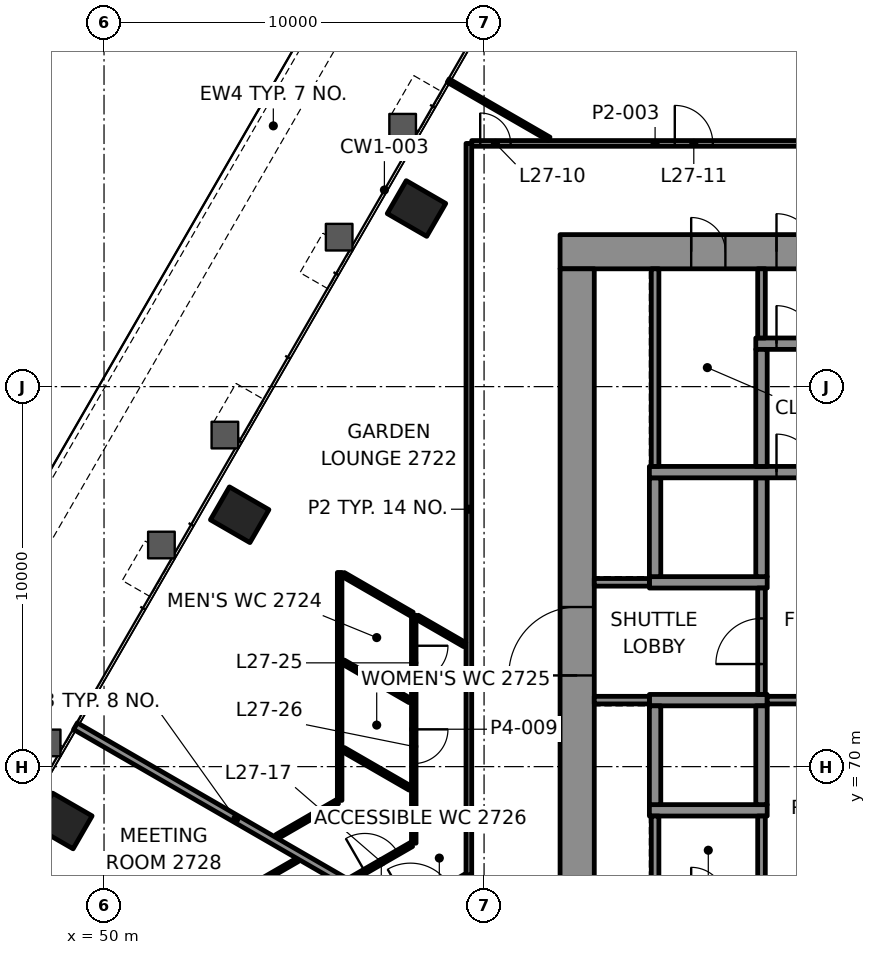
"""IFC4 building model, lengths in metres.
Left out: names, types, materials, properties, quantities, classifications, styles, units other than length and angle.
Written with IfcOpenShell. Run it as: python <this file> out.ifc"""

import sys

from ifc_helpers import new_model, si_unit, direction, frame, frame_2d, origin, origin_2d, place, context, subcontext, project, spatial, rectangle, extrude, element, fill, save


model = new_model("IFC4")
c1 = context("Model", 3, precision=1e-05, world=origin(), true_north=direction((0.0, 1.0)))
c2 = subcontext(c1, "Body", "Model", "MODEL_VIEW")
j1 = project(units=[si_unit("LENGTHUNIT", "METRE"), si_unit("PLANEANGLEUNIT", "RADIAN")], contexts=[c1])
p1 = place(None, origin())
s1 = spatial("IfcSite", under=j1, at=p1, CompositionType="ELEMENT")
p2 = place(p1, origin())
s2 = spatial("IfcBuilding", under=s1, at=p2, CompositionType="ELEMENT")
p3 = place(p2, frame((0.0, 0.0, 119.8)))
s3 = spatial("IfcBuildingStorey", under=s2, at=p3, CompositionType="ELEMENT", Elevation=119.8)
for number, where, z_axis, x_axis in (
    (1, (58.222, 84.687, -0.0), (0.0, 0.0, 1.0), (-0.5, -0.866, 0.0)),
    (2, (53.569, 76.628, -0.0), (0.0, 0.0, 1.0), (-0.5, -0.866, 0.0)),
    (3, (48.917, 68.57, -0.0), (0.0, 0.0, 1.0), (-0.5, -0.866, 0.0)),
):
    element("IfcColumn", number, at=place(p3, frame(where, z_axis=z_axis, x_axis=x_axis)), inside=s3, PredefinedType="COLUMN", context=c2, shape_type="SweptSolid", body=[
        extrude(rectangle(XDim=1.0, YDim=1.2, at=origin_2d()), origin(), (0.0, 0.0, 1.0), 4.2),
    ])
p4 = place(p3, frame((62.0, 83.55, 0.0), z_axis=(0.0, 0.0, 1.0), x_axis=(1.0, 0.0, 0.0)))
e4 = element("IfcWall", 4, at=p4, inside=s3, PredefinedType="SHEAR", context=c2, shape_type="SweptSolid", body=[
    extrude(rectangle(XDim=26.0, YDim=0.9, at=frame_2d((13.0, 0.0))), origin(), (0.0, 0.0, 1.0), 4.0),
])
p5 = place(p4, frame((5.695, 0.0, 0.0)))
e5 = element("IfcOpeningElement", 5, at=p5, cuts=e4, PredefinedType="OPENING", context=c2, shape_type="SweptSolid", body=[
    extrude(rectangle(XDim=1.0, YDim=2.1, at=frame_2d((0.5, 1.05))), frame((0.0, 0.46, 0.0), z_axis=(0.0, -1.0, 0.0), x_axis=(1.0, 0.0, 0.0)), (0.0, 0.0, 1.0), 0.92),
])
p6 = place(p4, frame((19.505, 0.0, 0.0)))
e6 = element("IfcOpeningElement", 6, at=p6, cuts=e4, PredefinedType="OPENING", context=c2, shape_type="SweptSolid", body=[
    extrude(rectangle(XDim=1.0, YDim=2.1, at=frame_2d((0.5, 1.05))), frame((0.0, 0.46, 0.0), z_axis=(0.0, -1.0, 0.0), x_axis=(1.0, 0.0, 0.0)), (0.0, 0.0, 1.0), 0.92),
])
p7 = place(p4, frame((3.45, 0.0, 0.0)))
e7 = element("IfcOpeningElement", 7, at=p7, cuts=e4, PredefinedType="OPENING", context=c2, shape_type="SweptSolid", body=[
    extrude(rectangle(XDim=0.9, YDim=2.1, at=frame_2d((0.45, 1.05))), frame((0.0, 0.46, 0.0), z_axis=(0.0, -1.0, 0.0), x_axis=(1.0, 0.0, 0.0)), (0.0, 0.0, 1.0), 0.92),
])
p8 = place(p4, frame((12.65, 0.0, 0.0)))
e8 = element("IfcOpeningElement", 8, at=p8, cuts=e4, PredefinedType="OPENING", context=c2, shape_type="SweptSolid", body=[
    extrude(rectangle(XDim=0.9, YDim=2.1, at=frame_2d((0.45, 1.05))), frame((0.0, 0.46, 0.0), z_axis=(0.0, -1.0, 0.0), x_axis=(1.0, 0.0, 0.0)), (0.0, 0.0, 1.0), 0.92),
])
p9 = place(p4, frame((22.55, 0.0, 0.0)))
e9 = element("IfcOpeningElement", 9, at=p9, cuts=e4, PredefinedType="OPENING", context=c2, shape_type="SweptSolid", body=[
    extrude(rectangle(XDim=0.9, YDim=2.1, at=frame_2d((0.45, 1.05))), frame((0.0, 0.46, 0.0), z_axis=(0.0, -1.0, 0.0), x_axis=(1.0, 0.0, 0.0)), (0.0, 0.0, 1.0), 0.92),
])
p10 = place(p3, frame((62.45, 66.9, 0.0), z_axis=(0.0, 0.0, 1.0), x_axis=(0.0, 1.0, 0.0)))
e10 = element("IfcWall", 10, at=p10, inside=s3, PredefinedType="SHEAR", context=c2, shape_type="SweptSolid", body=[
    extrude(rectangle(XDim=16.2, YDim=0.9, at=frame_2d((8.1, 0.0))), origin(), (0.0, 0.0, 1.0), 4.0),
])
p11 = place(p10, frame((5.5, 0.0, 0.0)))
e11 = element("IfcOpeningElement", 11, at=p11, cuts=e10, PredefinedType="OPENING", context=c2, shape_type="SweptSolid", body=[
    extrude(rectangle(XDim=1.8, YDim=2.1, at=frame_2d((0.9, 1.05))), frame((0.0, 0.46, 0.0), z_axis=(0.0, -1.0, 0.0), x_axis=(1.0, 0.0, 0.0)), (0.0, 0.0, 1.0), 0.92),
])
for number, where, z_axis, x_axis in (
    (12, (64.35, 68.85, 0.0), (0.0, 0.0, 1.0), (1.0, 0.0, 0.0)),
    (13, (64.35, 71.75, 0.0), (0.0, 0.0, 1.0), (1.0, 0.0, 0.0)),
    (14, (64.35, 74.85, 0.0), (0.0, 0.0, 1.0), (1.0, 0.0, 0.0)),
):
    element("IfcWall", number, at=place(p3, frame(where, z_axis=z_axis, x_axis=x_axis)), inside=s3, PredefinedType="SHEAR", context=c2, shape_type="SweptSolid", body=[
        extrude(rectangle(XDim=3.1, YDim=0.3, at=frame_2d((1.55, 0.0))), origin(), (0.0, 0.0, 1.0), 4.0),
    ])
for number, where, z_axis, x_axis in (
    (15, (64.5, 69.0, 0.0), (0.0, 0.0, 1.0), (0.0, 1.0, 0.0)),
    (16, (64.5, 75.0, 0.0), (0.0, 0.0, 1.0), (0.0, 1.0, 0.0)),
    (17, (67.3, 69.0, 0.0), (0.0, 0.0, 1.0), (0.0, 1.0, 0.0)),
    (18, (67.3, 75.0, 0.0), (0.0, 0.0, 1.0), (0.0, 1.0, 0.0)),
):
    element("IfcWall", number, at=place(p3, frame(where, z_axis=z_axis, x_axis=x_axis)), inside=s3, PredefinedType="SHEAR", context=c2, shape_type="SweptSolid", body=[
        extrude(rectangle(XDim=2.6, YDim=0.3, at=frame_2d((1.3, 0.0))), origin(), (0.0, 0.0, 1.0), 4.0),
    ])
p12 = place(p3, frame((64.35, 77.75, 0.0), z_axis=(0.0, 0.0, 1.0), x_axis=(1.0, 0.0, 0.0)))
e19 = element("IfcWall", 19, at=p12, inside=s3, PredefinedType="SHEAR", context=c2, shape_type="SweptSolid", body=[
    extrude(rectangle(XDim=22.75, YDim=0.3, at=frame_2d((11.375, 0.0))), origin(), (0.0, 0.0, 1.0), 4.0),
])
p13 = place(p12, frame((3.345, 0.0, 0.0)))
e20 = element("IfcOpeningElement", 20, at=p13, cuts=e19, PredefinedType="OPENING", context=c2, shape_type="SweptSolid", body=[
    extrude(rectangle(XDim=1.0, YDim=2.1, at=frame_2d((0.5, 1.05))), frame((0.0, 0.16, 0.0), z_axis=(0.0, -1.0, 0.0), x_axis=(1.0, 0.0, 0.0)), (0.0, 0.0, 1.0), 0.32),
])
p14 = place(p3, frame((67.15, 81.13, 0.0), z_axis=(0.0, 0.0, 1.0), x_axis=(1.0, 0.0, 0.0)))
e21 = element("IfcWall", 21, at=p14, inside=s3, PredefinedType="SHEAR", context=c2, shape_type="SweptSolid", body=[
    extrude(rectangle(XDim=6.91, YDim=0.3, at=frame_2d((3.455, 0.0))), origin(), (0.0, 0.0, 1.0), 4.0),
])
p15 = place(p14, frame((0.545, 0.0, 0.0)))
e22 = element("IfcOpeningElement", 22, at=p15, cuts=e21, PredefinedType="OPENING", context=c2, shape_type="SweptSolid", body=[
    extrude(rectangle(XDim=1.0, YDim=2.1, at=frame_2d((0.5, 1.05))), frame((0.0, 0.16, 0.0), z_axis=(0.0, -1.0, 0.0), x_axis=(1.0, 0.0, 0.0)), (0.0, 0.0, 1.0), 0.32),
])
p16 = place(p3, frame((67.3, 77.9, 0.0), z_axis=(0.0, 0.0, 1.0), x_axis=(0.0, 1.0, 0.0)))
e23 = element("IfcWall", 23, at=p16, inside=s3, PredefinedType="SHEAR", context=c2, shape_type="SweptSolid", body=[
    extrude(rectangle(XDim=3.08, YDim=0.3, at=frame_2d((1.54, 0.0))), origin(), (0.0, 0.0, 1.0), 4.0),
])
p17 = place(p3, frame((59.676, 86.4, 0.0), z_axis=(0.0, 0.0, 1.0), x_axis=(1.0, 0.0, 0.0)))
e24 = element("IfcWall", 24, at=p17, inside=s3, PredefinedType="PARTITIONING", context=c2, shape_type="SweptSolid", body=[
    extrude(rectangle(XDim=9.649, YDim=0.15, at=frame_2d((4.825, 0.0))), origin(), (0.0, 0.0, 1.0), 3.4),
])
p18 = place(p17, frame((0.223, 0.0, 0.0)))
e25 = element("IfcOpeningElement", 25, at=p18, cuts=e24, PredefinedType="OPENING", context=c2, shape_type="SweptSolid", body=[
    extrude(rectangle(XDim=0.8, YDim=2.1, at=frame_2d((0.4, 1.05))), frame((0.0, 0.085, 0.0), z_axis=(0.0, -1.0, 0.0), x_axis=(1.0, 0.0, 0.0)), (0.0, 0.0, 1.0), 0.17),
])
p19 = place(p17, frame((5.343, 0.0, 0.0)))
e26 = element("IfcOpeningElement", 26, at=p19, cuts=e24, PredefinedType="OPENING", context=c2, shape_type="SweptSolid", body=[
    extrude(rectangle(XDim=1.0, YDim=2.1, at=frame_2d((0.5, 1.05))), frame((0.0, 0.085, 0.0), z_axis=(0.0, -1.0, 0.0), x_axis=(1.0, 0.0, 0.0)), (0.0, 0.0, 1.0), 0.17),
])
p20 = place(p3, frame((47.866, 60.374, 0.0), z_axis=(0.0, 0.0, 1.0), x_axis=(0.866031566243, 0.499989326157, 0.0)))
e27 = element("IfcWall", 27, at=p20, inside=s3, PredefinedType="PARTITIONING", context=c2, shape_type="SweptSolid", body=[
    extrude(rectangle(XDim=13.462, YDim=0.15, at=frame_2d((6.731, 0.0))), origin(), (0.0, 0.0, 1.0), 3.4),
])
p21 = place(p20, frame((11.774, 0.0, 0.0)))
e28 = element("IfcOpeningElement", 28, at=p21, cuts=e27, PredefinedType="OPENING", context=c2, shape_type="SweptSolid", body=[
    extrude(rectangle(XDim=1.2, YDim=2.1, at=frame_2d((0.6, 1.05))), frame((0.0, 0.085, 0.0), z_axis=(0.0, -1.0, 0.0), x_axis=(1.0, 0.0, 0.0)), (0.0, 0.0, 1.0), 0.17),
])
p22 = place(p3, frame((56.501, 67.033, 0.0), z_axis=(0.0, 0.0, 1.0), x_axis=(0.866023842607, 0.500002704028, 0.0)))
e29 = element("IfcWall", 29, at=p22, inside=s3, PredefinedType="PARTITIONING", context=c2, shape_type="SweptSolid", body=[
    extrude(rectangle(XDim=1.835, YDim=0.12, at=frame_2d((0.917, 0.0))), origin(), (0.0, 0.0, 1.0), 3.4),
])
p23 = place(p22, frame((0.417, 0.0, 0.0)))
e30 = element("IfcOpeningElement", 30, at=p23, cuts=e29, PredefinedType="OPENING", context=c2, shape_type="SweptSolid", body=[
    extrude(rectangle(XDim=1.0, YDim=2.1, at=frame_2d((0.5, 1.05))), frame((0.0, 0.07, 0.0), z_axis=(0.0, -1.0, 0.0), x_axis=(1.0, 0.0, 0.0)), (0.0, 0.0, 1.0), 0.14),
])
p24 = place(p3, frame((55.09, 67.547, 0.0), z_axis=(0.0, 0.0, 1.0), x_axis=(-0.8660245535, -0.500001472733, 0.0)))
e31 = element("IfcWall", 31, at=p24, inside=s3, PredefinedType="PARTITIONING", context=c2, shape_type="SweptSolid", body=[
    extrude(rectangle(XDim=6.968, YDim=0.1, at=frame_2d((3.484, 0.0))), origin(), (0.0, 0.0, 1.0), 3.4),
])
p25 = place(p24, frame((3.034, 0.0, 0.0)))
e32 = element("IfcOpeningElement", 32, at=p25, cuts=e31, PredefinedType="OPENING", context=c2, shape_type="SweptSolid", body=[
    extrude(rectangle(XDim=0.9, YDim=2.1, at=frame_2d((0.45, 1.05))), frame((0.0, 0.06, 0.0), z_axis=(0.0, -1.0, 0.0), x_axis=(1.0, 0.0, 0.0)), (0.0, 0.0, 1.0), 0.12),
])
p26 = place(p3, frame((54.551, 68.159, 0.0), z_axis=(0.0, 0.0, 1.0), x_axis=(0.866023842607, 0.500002704028, 0.0)))
e33 = element("IfcWall", 33, at=p26, inside=s3, PredefinedType="PARTITIONING", context=c2, shape_type="SweptSolid", body=[
    extrude(rectangle(XDim=1.835, YDim=0.12, at=frame_2d((0.917, 0.0))), origin(), (0.0, 0.0, 1.0), 3.4),
])
p27 = place(p3, frame((59.6, 67.148, 0.0), z_axis=(0.0, 0.0, 1.0), x_axis=(0.0, 1.0, 0.0)))
e34 = element("IfcWall", 34, at=p27, inside=s3, PredefinedType="PARTITIONING", context=c2, shape_type="SweptSolid", body=[
    extrude(rectangle(XDim=19.251, YDim=0.15, at=frame_2d((9.626, 0.0))), origin(), (0.0, 0.0, 1.0), 3.4),
])
p28 = place(p3, frame((58.15, 73.984, 0.0), z_axis=(0.0, 0.0, 1.0), x_axis=(0.0, -1.0, 0.0)))
e35 = element("IfcWall", 35, at=p28, inside=s3, PredefinedType="PARTITIONING", context=c2, shape_type="SweptSolid", body=[
    extrude(rectangle(XDim=5.999, YDim=0.12, at=frame_2d((3.0, 0.0))), origin(), (0.0, 0.0, 1.0), 3.4),
])
p29 = place(p28, frame((0.803, 0.0, 0.0)))
e36 = element("IfcOpeningElement", 36, at=p29, cuts=e35, PredefinedType="OPENING", context=c2, shape_type="SweptSolid", body=[
    extrude(rectangle(XDim=0.9, YDim=2.1, at=frame_2d((0.45, 1.05))), frame((0.0, 0.07, 0.0), z_axis=(0.0, -1.0, 0.0), x_axis=(1.0, 0.0, 0.0)), (0.0, 0.0, 1.0), 0.14),
])
p30 = place(p28, frame((3.003, 0.0, 0.0)))
e37 = element("IfcOpeningElement", 37, at=p30, cuts=e35, PredefinedType="OPENING", context=c2, shape_type="SweptSolid", body=[
    extrude(rectangle(XDim=0.9, YDim=2.1, at=frame_2d((0.45, 1.05))), frame((0.0, 0.07, 0.0), z_axis=(0.0, -1.0, 0.0), x_axis=(1.0, 0.0, 0.0)), (0.0, 0.0, 1.0), 0.14),
])
p31 = place(p3, frame((56.2, 69.111, 0.0), z_axis=(0.0, 0.0, 1.0), x_axis=(0.0, 1.0, 0.0)))
e38 = element("IfcWall", 38, at=p31, inside=s3, PredefinedType="PARTITIONING", context=c2, shape_type="SweptSolid", body=[
    extrude(rectangle(XDim=5.999, YDim=0.12, at=frame_2d((2.999, 0.0))), origin(), (0.0, 0.0, 1.0), 3.4),
])
p32 = place(p3, frame((61.71, 86.52, 0.0), z_axis=(0.0, 0.0, 1.0), x_axis=(-0.866038331766, 0.499977607411, 0.0)))
e39 = element("IfcWall", 39, at=p32, inside=s3, PredefinedType="PARTITIONING", context=c2, shape_type="SweptSolid", body=[
    extrude(rectangle(XDim=3.065, YDim=0.1, at=frame_2d((1.532, 0.0))), origin(), (0.0, 0.0, 1.0), 3.165),
])
p33 = place(p3, frame((59.49, 73.21, 0.0), z_axis=(0.0, 0.0, 1.0), x_axis=(-0.86596595808, 0.500102948848, 0.0)))
e40 = element("IfcWall", 40, at=p33, inside=s3, PredefinedType="PARTITIONING", context=c2, shape_type="SweptSolid", body=[
    extrude(rectangle(XDim=1.444, YDim=0.12, at=frame_2d((0.722, 0.0))), origin(), (0.0, 0.0, 1.0), 3.4),
])
for number, where, z_axis, x_axis in (
    (41, (58.055, 71.736, 0.0), (0.0, 0.0, 1.0), (-0.866, 0.5, 0.0)),
    (42, (58.055, 69.434, 0.0), (0.0, 0.0, 1.0), (-0.866, 0.5, 0.0)),
):
    element("IfcWall", number, at=place(p3, frame(where, z_axis=z_axis, x_axis=x_axis)), inside=s3, PredefinedType="PARTITIONING", context=c2, shape_type="SweptSolid", body=[
        extrude(rectangle(XDim=2.033, YDim=0.12, at=frame_2d((1.017, 0.0))), origin(), (0.0, 0.0, 1.0), 3.4),
    ])
p34 = place(p3, frame((57.689, 66.191, 0.0), z_axis=(0.0, 0.0, 1.0), x_axis=(-0.866022484486, 0.500005056339, 0.0)))
e43 = element("IfcWall", 43, at=p34, inside=s3, PredefinedType="PARTITIONING", context=c2, shape_type="SweptSolid", body=[
    extrude(rectangle(XDim=9.747, YDim=0.2, at=frame_2d((4.873, 0.0))), origin(), (0.0, 0.0, 1.0), 3.165),
])
p35 = place(p3, frame((58.105, 74.01, 0.0), z_axis=(0.0, 0.0, 1.0), x_axis=(-0.866028046028, 0.499995423472, 0.0)))
e44 = element("IfcWall", 44, at=p35, inside=s3, PredefinedType="PARTITIONING", context=c2, shape_type="SweptSolid", body=[
    extrude(rectangle(XDim=2.09, YDim=0.12, at=frame_2d((1.045, 0.0))), origin(), (0.0, 0.0, 1.0), 3.4),
])
p36 = place(p3, frame((69.117, 112.258, 0.0), z_axis=(0.0, 0.0, 1.0), x_axis=(-0.500000992643, -0.866024830681, 0.0)))
e45 = element("IfcWall", 45, at=p36, inside=s3, PredefinedType="SOLIDWALL", context=c2, shape_type="SweptSolid", body=[
    extrude(rectangle(XDim=58.649, YDim=0.8, at=frame_2d((29.325, 0.0))), origin(), (0.0, 0.0, 1.0), 0.9),
])
p37 = place(p3, frame((62.9, 71.75, 0.0), z_axis=(0.0, 0.0, 1.0), x_axis=(1.0, 0.0, 0.0)))
e46 = element("IfcWall", 46, at=p37, inside=s3, PredefinedType="PARTITIONING", context=c2, shape_type="SweptSolid", body=[
    extrude(rectangle(XDim=1.45, YDim=0.2, at=frame_2d((0.725, 0.0))), origin(), (0.0, 0.0, 1.0), 4.0),
])
p38 = place(p3, frame((67.45, 71.75, 0.0), z_axis=(0.0, 0.0, 1.0), x_axis=(1.0, 0.0, 0.0)))
e47 = element("IfcWall", 47, at=p38, inside=s3, PredefinedType="PARTITIONING", context=c2, shape_type="SweptSolid", body=[
    extrude(rectangle(XDim=2.85, YDim=0.2, at=frame_2d((1.425, 0.0))), origin(), (0.0, 0.0, 1.0), 4.0),
])
p39 = place(p3, frame((62.9, 74.85, 0.0), z_axis=(0.0, 0.0, 1.0), x_axis=(1.0, 0.0, 0.0)))
e48 = element("IfcWall", 48, at=p39, inside=s3, PredefinedType="PARTITIONING", context=c2, shape_type="SweptSolid", body=[
    extrude(rectangle(XDim=1.45, YDim=0.2, at=frame_2d((0.725, 0.0))), origin(), (0.0, 0.0, 1.0), 4.0),
])
p40 = place(p3, frame((64.5, 66.9, 0.0), z_axis=(0.0, 0.0, 1.0), x_axis=(0.0, 1.0, 0.0)))
e49 = element("IfcWall", 49, at=p40, inside=s3, PredefinedType="PARTITIONING", context=c2, shape_type="SweptSolid", body=[
    extrude(rectangle(XDim=1.8, YDim=0.2, at=frame_2d((0.9, 0.0))), origin(), (0.0, 0.0, 1.0), 4.0),
])
p41 = place(p3, frame((64.5, 77.9, 0.0), z_axis=(0.0, 0.0, 1.0), x_axis=(0.0, 1.0, 0.0)))
e50 = element("IfcWall", 50, at=p41, inside=s3, PredefinedType="PARTITIONING", context=c2, shape_type="SweptSolid", body=[
    extrude(rectangle(XDim=5.2, YDim=0.2, at=frame_2d((2.6, 0.0))), origin(), (0.0, 0.0, 1.0), 4.0),
])
p42 = place(p3, frame((67.3, 66.9, 0.0), z_axis=(0.0, 0.0, 1.0), x_axis=(0.0, 1.0, 0.0)))
e51 = element("IfcWall", 51, at=p42, inside=s3, PredefinedType="PARTITIONING", context=c2, shape_type="SweptSolid", body=[
    extrude(rectangle(XDim=1.8, YDim=0.2, at=frame_2d((0.9, 0.0))), origin(), (0.0, 0.0, 1.0), 4.0),
])
p43 = place(p3, frame((67.3, 71.9, 0.0), z_axis=(0.0, 0.0, 1.0), x_axis=(0.0, 1.0, 0.0)))
e52 = element("IfcWall", 52, at=p43, inside=s3, PredefinedType="PARTITIONING", context=c2, shape_type="SweptSolid", body=[
    extrude(rectangle(XDim=2.8, YDim=0.2, at=frame_2d((1.4, 0.0))), origin(), (0.0, 0.0, 1.0), 4.0),
])
p44 = place(p43, frame((0.8, 0.0, 0.0)))
e53 = element("IfcOpeningElement", 53, at=p44, cuts=e52, PredefinedType="OPENING", context=c2, shape_type="SweptSolid", body=[
    extrude(rectangle(XDim=1.2, YDim=2.1, at=frame_2d((0.6, 1.05))), frame((0.0, 0.11, 0.0), z_axis=(0.0, -1.0, 0.0), x_axis=(1.0, 0.0, 0.0)), (0.0, 0.0, 1.0), 0.22),
])
p45 = place(p3, frame((67.3, 81.28, 0.0), z_axis=(0.0, 0.0, 1.0), x_axis=(0.0, 1.0, 0.0)))
e54 = element("IfcWall", 54, at=p45, inside=s3, PredefinedType="PARTITIONING", context=c2, shape_type="SweptSolid", body=[
    extrude(rectangle(XDim=1.82, YDim=0.2, at=frame_2d((0.91, 0.0))), origin(), (0.0, 0.0, 1.0), 4.0),
])
p46 = place(p18, origin())
e55 = element("IfcDoor", 55, at=p46, inside=s3, OperationType="SINGLE_SWING_LEFT", PredefinedType="DOOR", context=c2, shape_type="SweptSolid", body=[
    extrude(rectangle(XDim=0.8, YDim=2.1, at=frame_2d((0.4, 1.05))), frame((0.0, 0.025, 0.0), z_axis=(0.0, -1.0, 0.0), x_axis=(1.0, 0.0, 0.0)), (0.0, 0.0, 1.0), 0.05),
])
fill(e25, e55)
p47 = place(p19, origin())
e56 = element("IfcDoor", 56, at=p47, inside=s3, OperationType="SINGLE_SWING_RIGHT", PredefinedType="DOOR", context=c2, shape_type="SweptSolid", body=[
    extrude(rectangle(XDim=1.0, YDim=2.1, at=frame_2d((0.5, 1.05))), frame((0.0, 0.025, 0.0), z_axis=(0.0, -1.0, 0.0), x_axis=(1.0, 0.0, 0.0)), (0.0, 0.0, 1.0), 0.05),
])
fill(e26, e56)
p48 = place(p23, origin())
e57 = element("IfcDoor", 57, at=p48, inside=s3, OperationType="SINGLE_SWING_LEFT", PredefinedType="DOOR", context=c2, shape_type="SweptSolid", body=[
    extrude(rectangle(XDim=1.0, YDim=2.1, at=frame_2d((0.5, 1.05))), frame((0.0, 0.025, 0.0), z_axis=(0.0, -1.0, 0.0), x_axis=(1.0, 0.0, 0.0)), (0.0, 0.0, 1.0), 0.05),
])
fill(e30, e57)
p49 = place(p29, origin())
e58 = element("IfcDoor", 58, at=p49, inside=s3, OperationType="SINGLE_SWING_RIGHT", PredefinedType="DOOR", context=c2, shape_type="SweptSolid", body=[
    extrude(rectangle(XDim=0.9, YDim=2.1, at=frame_2d((0.45, 1.05))), frame((0.0, 0.025, 0.0), z_axis=(0.0, -1.0, 0.0), x_axis=(1.0, 0.0, 0.0)), (0.0, 0.0, 1.0), 0.05),
])
fill(e36, e58)
p50 = place(p30, origin())
e59 = element("IfcDoor", 59, at=p50, inside=s3, OperationType="SINGLE_SWING_LEFT", PredefinedType="DOOR", context=c2, shape_type="SweptSolid", body=[
    extrude(rectangle(XDim=0.9, YDim=2.1, at=frame_2d((0.45, 1.05))), frame((0.0, 0.025, 0.0), z_axis=(0.0, -1.0, 0.0), x_axis=(1.0, 0.0, 0.0)), (0.0, 0.0, 1.0), 0.05),
])
fill(e37, e59)
p51 = place(p13, origin())
e60 = element("IfcDoor", 60, at=p51, inside=s3, OperationType="SINGLE_SWING_LEFT", PredefinedType="DOOR", context=c2, shape_type="SweptSolid", body=[
    extrude(rectangle(XDim=1.0, YDim=2.1, at=frame_2d((0.5, 1.05))), frame((0.0, 0.025, 0.0), z_axis=(0.0, -1.0, 0.0), x_axis=(1.0, 0.0, 0.0)), (0.0, 0.0, 1.0), 0.05),
])
fill(e20, e60)
p52 = place(p15, origin())
e61 = element("IfcDoor", 61, at=p52, inside=s3, OperationType="SINGLE_SWING_RIGHT", PredefinedType="DOOR", context=c2, shape_type="SweptSolid", body=[
    extrude(rectangle(XDim=1.0, YDim=2.1, at=frame_2d((0.5, 1.05))), frame((0.0, 0.025, 0.0), z_axis=(0.0, -1.0, 0.0), x_axis=(1.0, 0.0, 0.0)), (0.0, 0.0, 1.0), 0.05),
])
fill(e22, e61)
p53 = place(p5, origin())
e62 = element("IfcDoor", 62, at=p53, inside=s3, OperationType="SINGLE_SWING_LEFT", PredefinedType="DOOR", context=c2, shape_type="SweptSolid", body=[
    extrude(rectangle(XDim=1.0, YDim=2.1, at=frame_2d((0.5, 1.05))), frame((0.0, 0.17, 0.0), z_axis=(0.0, -1.0, 0.0), x_axis=(1.0, 0.0, 0.0)), (0.0, 0.0, 1.0), 0.34),
])
fill(e5, e62)
p54 = place(p44, origin())
e63 = element("IfcDoor", 63, at=p54, inside=s3, OperationType="SINGLE_SWING_RIGHT", PredefinedType="DOOR", context=c2, shape_type="SweptSolid", body=[
    extrude(rectangle(XDim=1.2, YDim=2.1, at=frame_2d((0.6, 1.05))), frame((0.0, 0.025, 0.0), z_axis=(0.0, -1.0, 0.0), x_axis=(1.0, 0.0, 0.0)), (0.0, 0.0, 1.0), 0.05),
])
fill(e53, e63)
p55 = place(p11, origin())
e64 = element("IfcDoor", 64, at=p55, inside=s3, OperationType="SINGLE_SWING_LEFT", PredefinedType="DOOR", context=c2, shape_type="SweptSolid", body=[
    extrude(rectangle(XDim=1.8, YDim=2.1, at=frame_2d((0.9, 1.05))), frame((0.0, 0.17, 0.0), z_axis=(0.0, -1.0, 0.0), x_axis=(1.0, 0.0, 0.0)), (0.0, 0.0, 1.0), 0.34),
])
fill(e11, e64)
p56 = place(p7, origin())
e65 = element("IfcDoor", 65, at=p56, inside=s3, OperationType="SINGLE_SWING_RIGHT", PredefinedType="DOOR", context=c2, shape_type="SweptSolid", body=[
    extrude(rectangle(XDim=0.9, YDim=2.1, at=frame_2d((0.45, 1.05))), frame((0.0, 0.17, 0.0), z_axis=(0.0, -1.0, 0.0), x_axis=(1.0, 0.0, 0.0)), (0.0, 0.0, 1.0), 0.34),
])
fill(e7, e65)
save(model, sys.argv[1])
